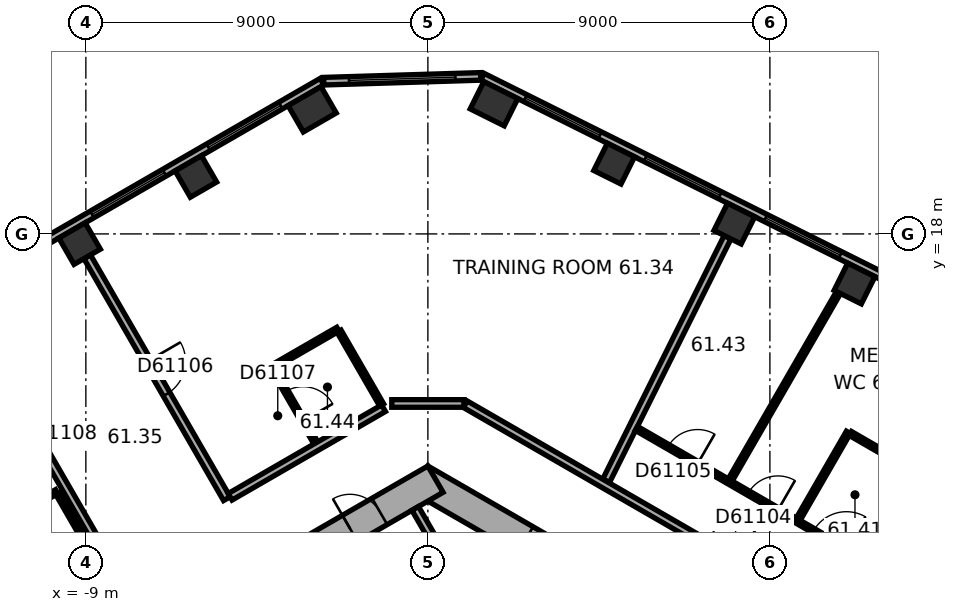
"""IFC4 building model, lengths in metres.
Left out: names, types, materials, properties, quantities, classifications, styles, units other than length and angle.
Written with IfcOpenShell. Run it as: python <this file> out.ifc"""

import sys

from ifc_helpers import new_model, si_unit, direction, frame, frame_2d, origin, origin_2d, place, context, subcontext, project, spatial, rectangle, extrude, element, fill, save


model = new_model("IFC4")
c1 = context("Model", 3, precision=1e-05, world=origin(), true_north=direction((0.0, 1.0)))
c2 = subcontext(c1, "Body", "Model", "MODEL_VIEW")
j1 = project(units=[si_unit("LENGTHUNIT", "METRE"), si_unit("PLANEANGLEUNIT", "RADIAN")], contexts=[c1])
p1 = place(None, origin())
s1 = spatial("IfcSite", under=j1, at=p1, CompositionType="ELEMENT")
p2 = place(p1, origin())
s2 = spatial("IfcBuilding", under=s1, at=p2, CompositionType="ELEMENT")
p3 = place(p2, frame((0.0, 0.0, 247.6)))
s3 = spatial("IfcBuildingStorey", under=s2, at=p3, CompositionType="ELEMENT", Elevation=247.6)
for number, where, z_axis, x_axis in (
    (1, (11.227, 16.695, 0.0), (0.0, 0.0, 1.0), (-0.895, 0.446, 0.0)),
    (2, (8.064, 18.271, 0.0), (0.0, 0.0, 1.0), (-0.895, 0.446, 0.0)),
    (3, (4.902, 19.848, 0.0), (0.0, 0.0, 1.0), (-0.895, 0.446, 0.0)),
):
    element("IfcColumn", number, at=place(p3, frame(where, z_axis=z_axis, x_axis=x_axis)), inside=s3, PredefinedType="COLUMN", context=c2, shape_type="SweptSolid", body=[
        extrude(rectangle(XDim=0.8, YDim=0.8, at=origin_2d()), origin(), (0.0, 0.0, 1.0), 3.7),
    ])
for number, where, z_axis, x_axis in (
    (4, (1.74, 21.425, 0.0), (0.0, 0.0, 1.0), (-0.895, 0.446, 0.0)),
    (5, (-3.044, 21.279, 0.0), (0.0, 0.0, 1.0), (-0.866, -0.5, 0.0)),
):
    element("IfcColumn", number, at=place(p3, frame(where, z_axis=z_axis, x_axis=x_axis)), inside=s3, PredefinedType="COLUMN", context=c2, shape_type="SweptSolid", body=[
        extrude(rectangle(XDim=1.0, YDim=0.8, at=origin_2d()), origin(), (0.0, 0.0, 1.0), 3.7),
    ])
for number, where, z_axis, x_axis in (
    (6, (-6.104, 19.512, 0.0), (0.0, 0.0, 1.0), (-0.866, -0.5, 0.0)),
    (7, (-9.165, 17.745, 0.0), (0.0, 0.0, 1.0), (-0.866, -0.5, 0.0)),
):
    element("IfcColumn", number, at=place(p3, frame(where, z_axis=z_axis, x_axis=x_axis)), inside=s3, PredefinedType="COLUMN", context=c2, shape_type="SweptSolid", body=[
        extrude(rectangle(XDim=0.8, YDim=0.8, at=origin_2d()), origin(), (0.0, 0.0, 1.0), 3.7),
    ])
p4 = place(p3, frame((10.1, 5.6, 0.0), z_axis=(0.0, 0.0, 1.0), x_axis=(-0.866023897231, 0.500002609418, 0.0)))
e8 = element("IfcWall", 8, at=p4, inside=s3, PredefinedType="SHEAR", context=c2, shape_type="SweptSolid", body=[
    extrude(rectangle(XDim=11.894, YDim=0.8, at=frame_2d((5.947, 0.0))), origin(), (0.0, 0.0, 1.0), 3.7),
])
p5 = place(p4, frame((3.897, 0.0, 0.0)))
e9 = element("IfcOpeningElement", 9, at=p5, cuts=e8, PredefinedType="OPENING", context=c2, shape_type="SweptSolid", body=[
    extrude(rectangle(XDim=0.9, YDim=2.1, at=frame_2d((0.45, 1.05))), frame((0.0, 0.41, 0.0), z_axis=(0.0, -1.0, 0.0), x_axis=(1.0, 0.0, 0.0)), (0.0, 0.0, 1.0), 0.82),
])
p6 = place(p4, frame((7.797, 0.0, 0.0)))
e10 = element("IfcOpeningElement", 10, at=p6, cuts=e8, PredefinedType="OPENING", context=c2, shape_type="SweptSolid", body=[
    extrude(rectangle(XDim=0.9, YDim=2.1, at=frame_2d((0.45, 1.05))), frame((0.0, 0.41, 0.0), z_axis=(0.0, -1.0, 0.0), x_axis=(1.0, 0.0, 0.0)), (0.0, 0.0, 1.0), 0.82),
])
p7 = place(p3, frame((0.2, 11.547, 0.0), z_axis=(0.0, 0.0, 1.0), x_axis=(-0.866023897231, -0.500002609418, 0.0)))
e11 = element("IfcWall", 11, at=p7, inside=s3, PredefinedType="SHEAR", context=c2, shape_type="SweptSolid", body=[
    extrude(rectangle(XDim=11.894, YDim=0.8, at=frame_2d((5.947, 0.0))), origin(), (0.0, 0.0, 1.0), 3.7),
])
p8 = place(p7, frame((6.147, 0.0, 0.0)))
e12 = element("IfcOpeningElement", 12, at=p8, cuts=e11, PredefinedType="OPENING", context=c2, shape_type="SweptSolid", body=[
    extrude(rectangle(XDim=1.5, YDim=2.1, at=frame_2d((0.75, 1.05))), frame((0.0, 0.41, 0.0), z_axis=(0.0, -1.0, 0.0), x_axis=(1.0, 0.0, 0.0)), (0.0, 0.0, 1.0), 0.82),
])
p9 = place(p7, frame((1.697, 0.0, 0.0)))
e13 = element("IfcOpeningElement", 13, at=p9, cuts=e11, PredefinedType="OPENING", context=c2, shape_type="SweptSolid", body=[
    extrude(rectangle(XDim=0.9, YDim=2.1, at=frame_2d((0.45, 1.05))), frame((0.0, 0.41, 0.0), z_axis=(0.0, -1.0, 0.0), x_axis=(1.0, 0.0, 0.0)), (0.0, 0.0, 1.0), 0.82),
])
p10 = place(p7, frame((4.297, 0.0, 0.0)))
e14 = element("IfcOpeningElement", 14, at=p10, cuts=e11, PredefinedType="OPENING", context=c2, shape_type="SweptSolid", body=[
    extrude(rectangle(XDim=0.9, YDim=2.1, at=frame_2d((0.45, 1.05))), frame((0.0, 0.41, 0.0), z_axis=(0.0, -1.0, 0.0), x_axis=(1.0, 0.0, 0.0)), (0.0, 0.0, 1.0), 0.82),
])
p11 = place(p3, frame((18.299, 13.727, 0.0), z_axis=(0.0, 0.0, 1.0), x_axis=(-0.894934554817, 0.44619742558, 0.0)))
e15 = element("IfcWall", 15, at=p11, inside=s3, PredefinedType="STANDARD", context=c2, shape_type="SweptSolid", body=[
    extrude(rectangle(XDim=18.841, YDim=0.2, at=frame_2d((9.421, 0.0))), origin(), (0.0, 0.0, 1.0), 3.7),
])
p12 = place(p11, frame((1.253, 0.0, 0.9)))
e16 = element("IfcOpeningElement", 16, at=p12, cuts=e15, PredefinedType="OPENING", context=c2, shape_type="SweptSolid", body=[
    extrude(rectangle(XDim=2.2, YDim=2.0, at=frame_2d((1.1, 1.0))), frame((0.0, 0.11, 0.0), z_axis=(0.0, -1.0, 0.0), x_axis=(1.0, 0.0, 0.0)), (0.0, 0.0, 1.0), 0.22),
])
p13 = place(p11, frame((4.786, 0.0, 0.9)))
e17 = element("IfcOpeningElement", 17, at=p13, cuts=e15, PredefinedType="OPENING", context=c2, shape_type="SweptSolid", body=[
    extrude(rectangle(XDim=2.2, YDim=2.0, at=frame_2d((1.1, 1.0))), frame((0.0, 0.11, 0.0), z_axis=(0.0, -1.0, 0.0), x_axis=(1.0, 0.0, 0.0)), (0.0, 0.0, 1.0), 0.22),
])
p14 = place(p11, frame((8.32, 0.0, 0.9)))
e18 = element("IfcOpeningElement", 18, at=p14, cuts=e15, PredefinedType="OPENING", context=c2, shape_type="SweptSolid", body=[
    extrude(rectangle(XDim=2.2, YDim=2.0, at=frame_2d((1.1, 1.0))), frame((0.0, 0.11, 0.0), z_axis=(0.0, -1.0, 0.0), x_axis=(1.0, 0.0, 0.0)), (0.0, 0.0, 1.0), 0.22),
])
p15 = place(p11, frame((11.854, 0.0, 0.9)))
e19 = element("IfcOpeningElement", 19, at=p15, cuts=e15, PredefinedType="OPENING", context=c2, shape_type="SweptSolid", body=[
    extrude(rectangle(XDim=2.2, YDim=2.0, at=frame_2d((1.1, 1.0))), frame((0.0, 0.11, 0.0), z_axis=(0.0, -1.0, 0.0), x_axis=(1.0, 0.0, 0.0)), (0.0, 0.0, 1.0), 0.22),
])
p16 = place(p11, frame((15.387, 0.0, 0.9)))
e20 = element("IfcOpeningElement", 20, at=p16, cuts=e15, PredefinedType="OPENING", context=c2, shape_type="SweptSolid", body=[
    extrude(rectangle(XDim=2.2, YDim=2.0, at=frame_2d((1.1, 1.0))), frame((0.0, 0.11, 0.0), z_axis=(0.0, -1.0, 0.0), x_axis=(1.0, 0.0, 0.0)), (0.0, 0.0, 1.0), 0.22),
])
p17 = place(p3, frame((1.389, 22.145, 0.0), z_axis=(0.0, 0.0, 1.0), x_axis=(-0.999534702881, -0.030502093955, 0.0)))
e21 = element("IfcWall", 21, at=p17, inside=s3, PredefinedType="STANDARD", context=c2, shape_type="SweptSolid", body=[
    extrude(rectangle(XDim=4.13, YDim=0.2, at=frame_2d((2.065, 0.0))), origin(), (0.0, 0.0, 1.0), 3.7),
])
p18 = place(p17, frame((0.665, 0.0, 0.9)))
e22 = element("IfcOpeningElement", 22, at=p18, cuts=e21, PredefinedType="OPENING", context=c2, shape_type="SweptSolid", body=[
    extrude(rectangle(XDim=2.8, YDim=2.0, at=frame_2d((1.4, 1.0))), frame((0.0, 0.11, 0.0), z_axis=(0.0, -1.0, 0.0), x_axis=(1.0, 0.0, 0.0)), (0.0, 0.0, 1.0), 0.22),
])
p19 = place(p3, frame((-2.786, 22.005, 0.0), z_axis=(0.0, 0.0, 1.0), x_axis=(-0.866026555358, -0.49999800541, 0.0)))
e23 = element("IfcWall", 23, at=p19, inside=s3, PredefinedType="STANDARD", context=c2, shape_type="SweptSolid", body=[
    extrude(rectangle(XDim=18.841, YDim=0.2, at=frame_2d((9.421, 0.0))), origin(), (0.0, 0.0, 1.0), 3.7),
])
p20 = place(p19, frame((1.254, 0.0, 0.9)))
e24 = element("IfcOpeningElement", 24, at=p20, cuts=e23, PredefinedType="OPENING", context=c2, shape_type="SweptSolid", body=[
    extrude(rectangle(XDim=2.2, YDim=2.0, at=frame_2d((1.1, 1.0))), frame((0.0, 0.11, 0.0), z_axis=(0.0, -1.0, 0.0), x_axis=(1.0, 0.0, 0.0)), (0.0, 0.0, 1.0), 0.22),
])
p21 = place(p19, frame((4.788, 0.0, 0.9)))
e25 = element("IfcOpeningElement", 25, at=p21, cuts=e23, PredefinedType="OPENING", context=c2, shape_type="SweptSolid", body=[
    extrude(rectangle(XDim=2.2, YDim=2.0, at=frame_2d((1.1, 1.0))), frame((0.0, 0.11, 0.0), z_axis=(0.0, -1.0, 0.0), x_axis=(1.0, 0.0, 0.0)), (0.0, 0.0, 1.0), 0.22),
])
p22 = place(p19, frame((8.321, 0.0, 0.9)))
e26 = element("IfcOpeningElement", 26, at=p22, cuts=e23, PredefinedType="OPENING", context=c2, shape_type="SweptSolid", body=[
    extrude(rectangle(XDim=2.2, YDim=2.0, at=frame_2d((1.1, 1.0))), frame((0.0, 0.11, 0.0), z_axis=(0.0, -1.0, 0.0), x_axis=(1.0, 0.0, 0.0)), (0.0, 0.0, 1.0), 0.22),
])
p23 = place(p19, frame((11.855, 0.0, 0.9)))
e27 = element("IfcOpeningElement", 27, at=p23, cuts=e23, PredefinedType="OPENING", context=c2, shape_type="SweptSolid", body=[
    extrude(rectangle(XDim=2.2, YDim=2.0, at=frame_2d((1.1, 1.0))), frame((0.0, 0.11, 0.0), z_axis=(0.0, -1.0, 0.0), x_axis=(1.0, 0.0, 0.0)), (0.0, 0.0, 1.0), 0.22),
])
p24 = place(p19, frame((15.389, 0.0, 0.9)))
e28 = element("IfcOpeningElement", 28, at=p24, cuts=e23, PredefinedType="OPENING", context=c2, shape_type="SweptSolid", body=[
    extrude(rectangle(XDim=2.2, YDim=2.0, at=frame_2d((1.1, 1.0))), frame((0.0, 0.11, 0.0), z_axis=(0.0, -1.0, 0.0), x_axis=(1.0, 0.0, 0.0)), (0.0, 0.0, 1.0), 0.22),
])
p25 = place(p3, frame((0.767, 8.872, 0.0), z_axis=(0.0, 0.0, 1.0), x_axis=(-0.499994660107, 0.866028486751, 0.0)))
e29 = element("IfcWall", 29, at=p25, inside=s3, PredefinedType="PARTITIONING", context=c2, shape_type="SweptSolid", body=[
    extrude(rectangle(XDim=2.2, YDim=0.2, at=frame_2d((1.1, 0.0))), origin(), (0.0, 0.0, 1.0), 3.42),
])
p26 = place(p3, frame((-12.025, 15.632, 0.0), z_axis=(0.0, 0.0, 1.0), x_axis=(0.499983153418, -0.866035129944, 0.0)))
e30 = element("IfcWall", 30, at=p26, inside=s3, PredefinedType="PARTITIONING", context=c2, shape_type="SweptSolid", body=[
    extrude(rectangle(XDim=7.35, YDim=0.2, at=frame_2d((3.675, 0.0))), origin(), (0.0, 0.0, 1.0), 3.42),
])
p27 = place(p26, frame((3.175, 0.0, 0.0)))
e31 = element("IfcOpeningElement", 31, at=p27, cuts=e30, PredefinedType="OPENING", context=c2, shape_type="SweptSolid", body=[
    extrude(rectangle(XDim=1.0, YDim=2.1, at=frame_2d((0.5, 1.05))), frame((0.0, 0.11, 0.0), z_axis=(0.0, -1.0, 0.0), x_axis=(1.0, 0.0, 0.0)), (0.0, 0.0, 1.0), 0.22),
])
p28 = place(p3, frame((-11.499, 10.22, 0.0), z_axis=(0.0, 0.0, 1.0), x_axis=(0.866010750942, 0.50002537861, 0.0)))
e32 = element("IfcWall", 32, at=p28, inside=s3, PredefinedType="PARTITIONING", context=c2, shape_type="SweptSolid", body=[
    extrude(rectangle(XDim=2.0, YDim=0.12, at=frame_2d((1.0, 0.0))), origin(), (0.0, 0.0, 1.0), 3.42),
])
p29 = place(p3, frame((-9.737, 11.168, 0.0), z_axis=(0.0, 0.0, 1.0), x_axis=(0.500030632641, -0.866007717299, 0.0)))
e33 = element("IfcWall", 33, at=p29, inside=s3, PredefinedType="PARTITIONING", context=c2, shape_type="SweptSolid", body=[
    extrude(rectangle(XDim=2.24, YDim=0.12, at=frame_2d((1.12, 0.0))), origin(), (0.0, 0.0, 1.0), 3.42),
])
p30 = place(p3, frame((-8.965, 17.399, 0.0), z_axis=(0.0, 0.0, 1.0), x_axis=(0.499993683172, -0.866029050776, 0.0)))
e34 = element("IfcWall", 34, at=p30, inside=s3, PredefinedType="PARTITIONING", context=c2, shape_type="SweptSolid", body=[
    extrude(rectangle(XDim=7.35, YDim=0.2, at=frame_2d((3.675, 0.0))), origin(), (0.0, 0.0, 1.0), 2.87),
])
p31 = place(p30, frame((3.175, 0.0, 0.0)))
e35 = element("IfcOpeningElement", 35, at=p31, cuts=e34, PredefinedType="OPENING", context=c2, shape_type="SweptSolid", body=[
    extrude(rectangle(XDim=1.0, YDim=2.1, at=frame_2d((0.5, 1.05))), frame((0.0, 0.11, 0.0), z_axis=(0.0, -1.0, 0.0), x_axis=(1.0, 0.0, 0.0)), (0.0, 0.0, 1.0), 0.22),
])
p32 = place(p3, frame((-4.099, 14.492, 0.0), z_axis=(0.0, 0.0, 1.0), x_axis=(0.866041268327, 0.499972520799, 0.0)))
e36 = element("IfcWall", 36, at=p32, inside=s3, PredefinedType="PARTITIONING", context=c2, shape_type="SweptSolid", body=[
    extrude(rectangle(XDim=2.0, YDim=0.12, at=frame_2d((1.0, 0.0))), origin(), (0.0, 0.0, 1.0), 3.42),
])
p33 = place(p3, frame((-2.948, 12.5, 0.0), z_axis=(0.0, 0.0, 1.0), x_axis=(-0.500077830873, 0.865980463445, 0.0)))
e37 = element("IfcWall", 37, at=p33, inside=s3, PredefinedType="PARTITIONING", context=c2, shape_type="SweptSolid", body=[
    extrude(rectangle(XDim=2.24, YDim=0.12, at=frame_2d((1.12, 0.0))), origin(), (0.0, 0.0, 1.0), 3.42),
])
p34 = place(p33, frame((0.67, 0.0, 0.0)))
e38 = element("IfcOpeningElement", 38, at=p34, cuts=e37, PredefinedType="OPENING", context=c2, shape_type="SweptSolid", body=[
    extrude(rectangle(XDim=0.9, YDim=2.1, at=frame_2d((0.45, 1.05))), frame((0.0, 0.07, 0.0), z_axis=(0.0, -1.0, 0.0), x_axis=(1.0, 0.0, 0.0)), (0.0, 0.0, 1.0), 0.14),
])
p35 = place(p3, frame((-2.336, 15.44, 0.0), z_axis=(0.0, 0.0, 1.0), x_axis=(0.49999608499, -0.866027664105, 0.0)))
e39 = element("IfcWall", 39, at=p35, inside=s3, PredefinedType="PARTITIONING", context=c2, shape_type="SweptSolid", body=[
    extrude(rectangle(XDim=2.24, YDim=0.12, at=frame_2d((1.12, 0.0))), origin(), (0.0, 0.0, 1.0), 3.42),
])
p36 = place(p3, frame((-1.167, 13.414, 0.0), z_axis=(0.0, 0.0, 1.0), x_axis=(-0.866023347809, -0.500003561037, 0.0)))
e40 = element("IfcWall", 40, at=p36, inside=s3, PredefinedType="PARTITIONING", context=c2, shape_type="SweptSolid", body=[
    extrude(rectangle(XDim=4.661, YDim=0.2, at=frame_2d((2.331, 0.0))), origin(), (0.0, 0.0, 1.0), 3.42),
])
p37 = place(p3, frame((0.95, 13.539, 0.0), z_axis=(0.0, 0.0, 1.0), x_axis=(-1.0, 0.0, 0.0)))
e41 = element("IfcWall", 41, at=p37, inside=s3, PredefinedType="PARTITIONING", context=c2, shape_type="SweptSolid", body=[
    extrude(rectangle(XDim=1.9, YDim=0.2, at=frame_2d((0.95, 0.0))), origin(), (0.0, 0.0, 1.0), 3.42),
])
p38 = place(p3, frame((7.886, 17.913, 0.0), z_axis=(0.0, 0.0, 1.0), x_axis=(-0.446204015428, -0.894931269213, 0.0)))
e42 = element("IfcWall", 42, at=p38, inside=s3, PredefinedType="PARTITIONING", context=c2, shape_type="SweptSolid", body=[
    extrude(rectangle(XDim=7.16, YDim=0.2, at=frame_2d((3.58, 0.0))), origin(), (0.0, 0.0, 1.0), 3.42),
])
p39 = place(p3, frame((10.805, 16.458, 0.0), z_axis=(0.0, 0.0, 1.0), x_axis=(-0.500025478307, -0.866010693377, 0.0)))
e43 = element("IfcWall", 43, at=p39, inside=s3, PredefinedType="PARTITIONING", context=c2, shape_type="SweptSolid", body=[
    extrude(rectangle(XDim=5.696, YDim=0.12, at=frame_2d((2.848, 0.0))), origin(), (0.0, 0.0, 1.0), 2.87),
])
p40 = place(p3, frame((11.065, 12.78, 0.0), z_axis=(0.0, 0.0, 1.0), x_axis=(-0.499938597367, -0.866060851709, 0.0)))
e44 = element("IfcWall", 44, at=p40, inside=s3, PredefinedType="PARTITIONING", context=c2, shape_type="SweptSolid", body=[
    extrude(rectangle(XDim=2.64, YDim=0.12, at=frame_2d((1.32, 0.0))), origin(), (0.0, 0.0, 1.0), 3.42),
])
p41 = place(p3, frame((11.25, 7.592, 0.0), z_axis=(0.0, 0.0, 1.0), x_axis=(-0.866024037175, 0.500002367029, 0.0)))
e45 = element("IfcWall", 45, at=p41, inside=s3, PredefinedType="PARTITIONING", context=c2, shape_type="SweptSolid", body=[
    extrude(rectangle(XDim=11.854, YDim=0.2, at=frame_2d((5.927, 0.0))), origin(), (0.0, 0.0, 1.0), 3.42),
])
p42 = place(p41, frame((3.59, 0.0, 0.0)))
e46 = element("IfcOpeningElement", 46, at=p42, cuts=e45, PredefinedType="OPENING", context=c2, shape_type="SweptSolid", body=[
    extrude(rectangle(XDim=1.0, YDim=2.1, at=frame_2d((0.5, 1.05))), frame((0.0, 0.11, 0.0), z_axis=(0.0, -1.0, 0.0), x_axis=(1.0, 0.0, 0.0)), (0.0, 0.0, 1.0), 0.22),
])
p43 = place(p3, frame((11.447, 9.441, 0.0), z_axis=(0.0, 0.0, 1.0), x_axis=(-0.866016001002, 0.500016285743, 0.0)))
e47 = element("IfcWall", 47, at=p43, inside=s3, PredefinedType="PARTITIONING", context=c2, shape_type="SweptSolid", body=[
    extrude(rectangle(XDim=6.881, YDim=0.12, at=frame_2d((3.44, 0.0))), origin(), (0.0, 0.0, 1.0), 3.42),
])
p44 = place(p43, frame((0.5, 0.0, 0.0)))
e48 = element("IfcOpeningElement", 48, at=p44, cuts=e47, PredefinedType="OPENING", context=c2, shape_type="SweptSolid", body=[
    extrude(rectangle(XDim=1.0, YDim=2.1, at=frame_2d((0.5, 1.05))), frame((0.0, 0.07, 0.0), z_axis=(0.0, -1.0, 0.0), x_axis=(1.0, 0.0, 0.0)), (0.0, 0.0, 1.0), 0.14),
])
p45 = place(p43, frame((2.583, 0.0, 0.0)))
e49 = element("IfcOpeningElement", 49, at=p45, cuts=e47, PredefinedType="OPENING", context=c2, shape_type="SweptSolid", body=[
    extrude(rectangle(XDim=0.9, YDim=2.1, at=frame_2d((0.45, 1.05))), frame((0.0, 0.07, 0.0), z_axis=(0.0, -1.0, 0.0), x_axis=(1.0, 0.0, 0.0)), (0.0, 0.0, 1.0), 0.14),
])
p46 = place(p43, frame((5.023, 0.0, 0.0)))
e50 = element("IfcOpeningElement", 50, at=p46, cuts=e47, PredefinedType="OPENING", context=c2, shape_type="SweptSolid", body=[
    extrude(rectangle(XDim=0.9, YDim=2.1, at=frame_2d((0.45, 1.05))), frame((0.0, 0.07, 0.0), z_axis=(0.0, -1.0, 0.0), x_axis=(1.0, 0.0, 0.0)), (0.0, 0.0, 1.0), 0.14),
])
p47 = place(p3, frame((12.654, 11.862, 0.0), z_axis=(0.0, 0.0, 1.0), x_axis=(-0.866025242659, 0.500000279077, 0.0)))
e51 = element("IfcWall", 51, at=p47, inside=s3, PredefinedType="PARTITIONING", context=c2, shape_type="SweptSolid", body=[
    extrude(rectangle(XDim=1.775, YDim=0.12, at=frame_2d((0.887, 0.0))), origin(), (0.0, 0.0, 1.0), 3.42),
])
p48 = place(p3, frame((14.211, 14.76, 0.0), z_axis=(0.0, 0.0, 1.0), x_axis=(-0.446197176117, -0.894934679195, 0.0)))
e52 = element("IfcWall", 52, at=p48, inside=s3, PredefinedType="PARTITIONING", context=c2, shape_type="SweptSolid", body=[
    extrude(rectangle(XDim=7.592, YDim=0.2, at=frame_2d((3.796, 0.0))), origin(), (0.0, 0.0, 1.0), 3.42),
])
p49 = place(p14, origin())
e53 = element("IfcWindow", 53, at=p49, inside=s3, PartitioningType="SINGLE_PANEL", PredefinedType="WINDOW", context=c2, shape_type="SweptSolid", body=[
    extrude(rectangle(XDim=2.2, YDim=2.0, at=frame_2d((1.1, 1.0))), frame((0.0, 0.03, 0.0), z_axis=(0.0, -1.0, 0.0), x_axis=(1.0, 0.0, 0.0)), (0.0, 0.0, 1.0), 0.06),
])
fill(e18, e53)
p50 = place(p15, origin())
e54 = element("IfcWindow", 54, at=p50, inside=s3, PartitioningType="SINGLE_PANEL", PredefinedType="WINDOW", context=c2, shape_type="SweptSolid", body=[
    extrude(rectangle(XDim=2.2, YDim=2.0, at=frame_2d((1.1, 1.0))), frame((0.0, 0.03, 0.0), z_axis=(0.0, -1.0, 0.0), x_axis=(1.0, 0.0, 0.0)), (0.0, 0.0, 1.0), 0.06),
])
fill(e19, e54)
p51 = place(p16, origin())
e55 = element("IfcWindow", 55, at=p51, inside=s3, PartitioningType="SINGLE_PANEL", PredefinedType="WINDOW", context=c2, shape_type="SweptSolid", body=[
    extrude(rectangle(XDim=2.2, YDim=2.0, at=frame_2d((1.1, 1.0))), frame((0.0, 0.03, 0.0), z_axis=(0.0, -1.0, 0.0), x_axis=(1.0, 0.0, 0.0)), (0.0, 0.0, 1.0), 0.06),
])
fill(e20, e55)
p52 = place(p18, origin())
e56 = element("IfcWindow", 56, at=p52, inside=s3, PartitioningType="SINGLE_PANEL", PredefinedType="WINDOW", context=c2, shape_type="SweptSolid", body=[
    extrude(rectangle(XDim=2.8, YDim=2.0, at=frame_2d((1.4, 1.0))), frame((0.0, 0.03, 0.0), z_axis=(0.0, -1.0, 0.0), x_axis=(1.0, 0.0, 0.0)), (0.0, 0.0, 1.0), 0.06),
])
fill(e22, e56)
p53 = place(p20, origin())
e57 = element("IfcWindow", 57, at=p53, inside=s3, PartitioningType="SINGLE_PANEL", PredefinedType="WINDOW", context=c2, shape_type="SweptSolid", body=[
    extrude(rectangle(XDim=2.2, YDim=2.0, at=frame_2d((1.1, 1.0))), frame((0.0, 0.03, 0.0), z_axis=(0.0, -1.0, 0.0), x_axis=(1.0, 0.0, 0.0)), (0.0, 0.0, 1.0), 0.06),
])
fill(e24, e57)
p54 = place(p21, origin())
e58 = element("IfcWindow", 58, at=p54, inside=s3, PartitioningType="SINGLE_PANEL", PredefinedType="WINDOW", context=c2, shape_type="SweptSolid", body=[
    extrude(rectangle(XDim=2.2, YDim=2.0, at=frame_2d((1.1, 1.0))), frame((0.0, 0.03, 0.0), z_axis=(0.0, -1.0, 0.0), x_axis=(1.0, 0.0, 0.0)), (0.0, 0.0, 1.0), 0.06),
])
fill(e25, e58)
p55 = place(p9, origin())
e59 = element("IfcDoor", 59, at=p55, inside=s3, OperationType="SINGLE_SWING_LEFT", PredefinedType="DOOR", context=c2, shape_type="SweptSolid", body=[
    extrude(rectangle(XDim=0.9, YDim=2.1, at=frame_2d((0.45, 1.05))), frame((0.0, 0.025, 0.0), z_axis=(0.0, -1.0, 0.0), x_axis=(1.0, 0.0, 0.0)), (0.0, 0.0, 1.0), 0.05),
])
fill(e13, e59)
p56 = place(p44, origin())
e60 = element("IfcDoor", 60, at=p56, inside=s3, OperationType="SINGLE_SWING_LEFT", PredefinedType="DOOR", context=c2, shape_type="SweptSolid", body=[
    extrude(rectangle(XDim=1.0, YDim=2.1, at=frame_2d((0.5, 1.05))), frame((0.0, 0.025, 0.0), z_axis=(0.0, -1.0, 0.0), x_axis=(1.0, 0.0, 0.0)), (0.0, 0.0, 1.0), 0.05),
])
fill(e48, e60)
p57 = place(p45, origin())
e61 = element("IfcDoor", 61, at=p57, inside=s3, OperationType="SINGLE_SWING_LEFT", PredefinedType="DOOR", context=c2, shape_type="SweptSolid", body=[
    extrude(rectangle(XDim=0.9, YDim=2.1, at=frame_2d((0.45, 1.05))), frame((0.0, 0.025, 0.0), z_axis=(0.0, -1.0, 0.0), x_axis=(1.0, 0.0, 0.0)), (0.0, 0.0, 1.0), 0.05),
])
fill(e49, e61)
p58 = place(p46, origin())
e62 = element("IfcDoor", 62, at=p58, inside=s3, OperationType="SINGLE_SWING_LEFT", PredefinedType="DOOR", context=c2, shape_type="SweptSolid", body=[
    extrude(rectangle(XDim=0.9, YDim=2.1, at=frame_2d((0.45, 1.05))), frame((0.0, 0.025, 0.0), z_axis=(0.0, -1.0, 0.0), x_axis=(1.0, 0.0, 0.0)), (0.0, 0.0, 1.0), 0.05),
])
fill(e50, e62)
p59 = place(p31, origin())
e63 = element("IfcDoor", 63, at=p59, inside=s3, OperationType="SINGLE_SWING_LEFT", PredefinedType="DOOR", context=c2, shape_type="SweptSolid", body=[
    extrude(rectangle(XDim=1.0, YDim=2.1, at=frame_2d((0.5, 1.05))), frame((0.0, 0.025, 0.0), z_axis=(0.0, -1.0, 0.0), x_axis=(1.0, 0.0, 0.0)), (0.0, 0.0, 1.0), 0.05),
])
fill(e35, e63)
p60 = place(p34, origin())
e64 = element("IfcDoor", 64, at=p60, inside=s3, OperationType="SINGLE_SWING_LEFT", PredefinedType="DOOR", context=c2, shape_type="SweptSolid", body=[
    extrude(rectangle(XDim=0.9, YDim=2.1, at=frame_2d((0.45, 1.05))), frame((0.0, 0.025, 0.0), z_axis=(0.0, -1.0, 0.0), x_axis=(1.0, 0.0, 0.0)), (0.0, 0.0, 1.0), 0.05),
])
fill(e38, e64)
save(model, sys.argv[1])
